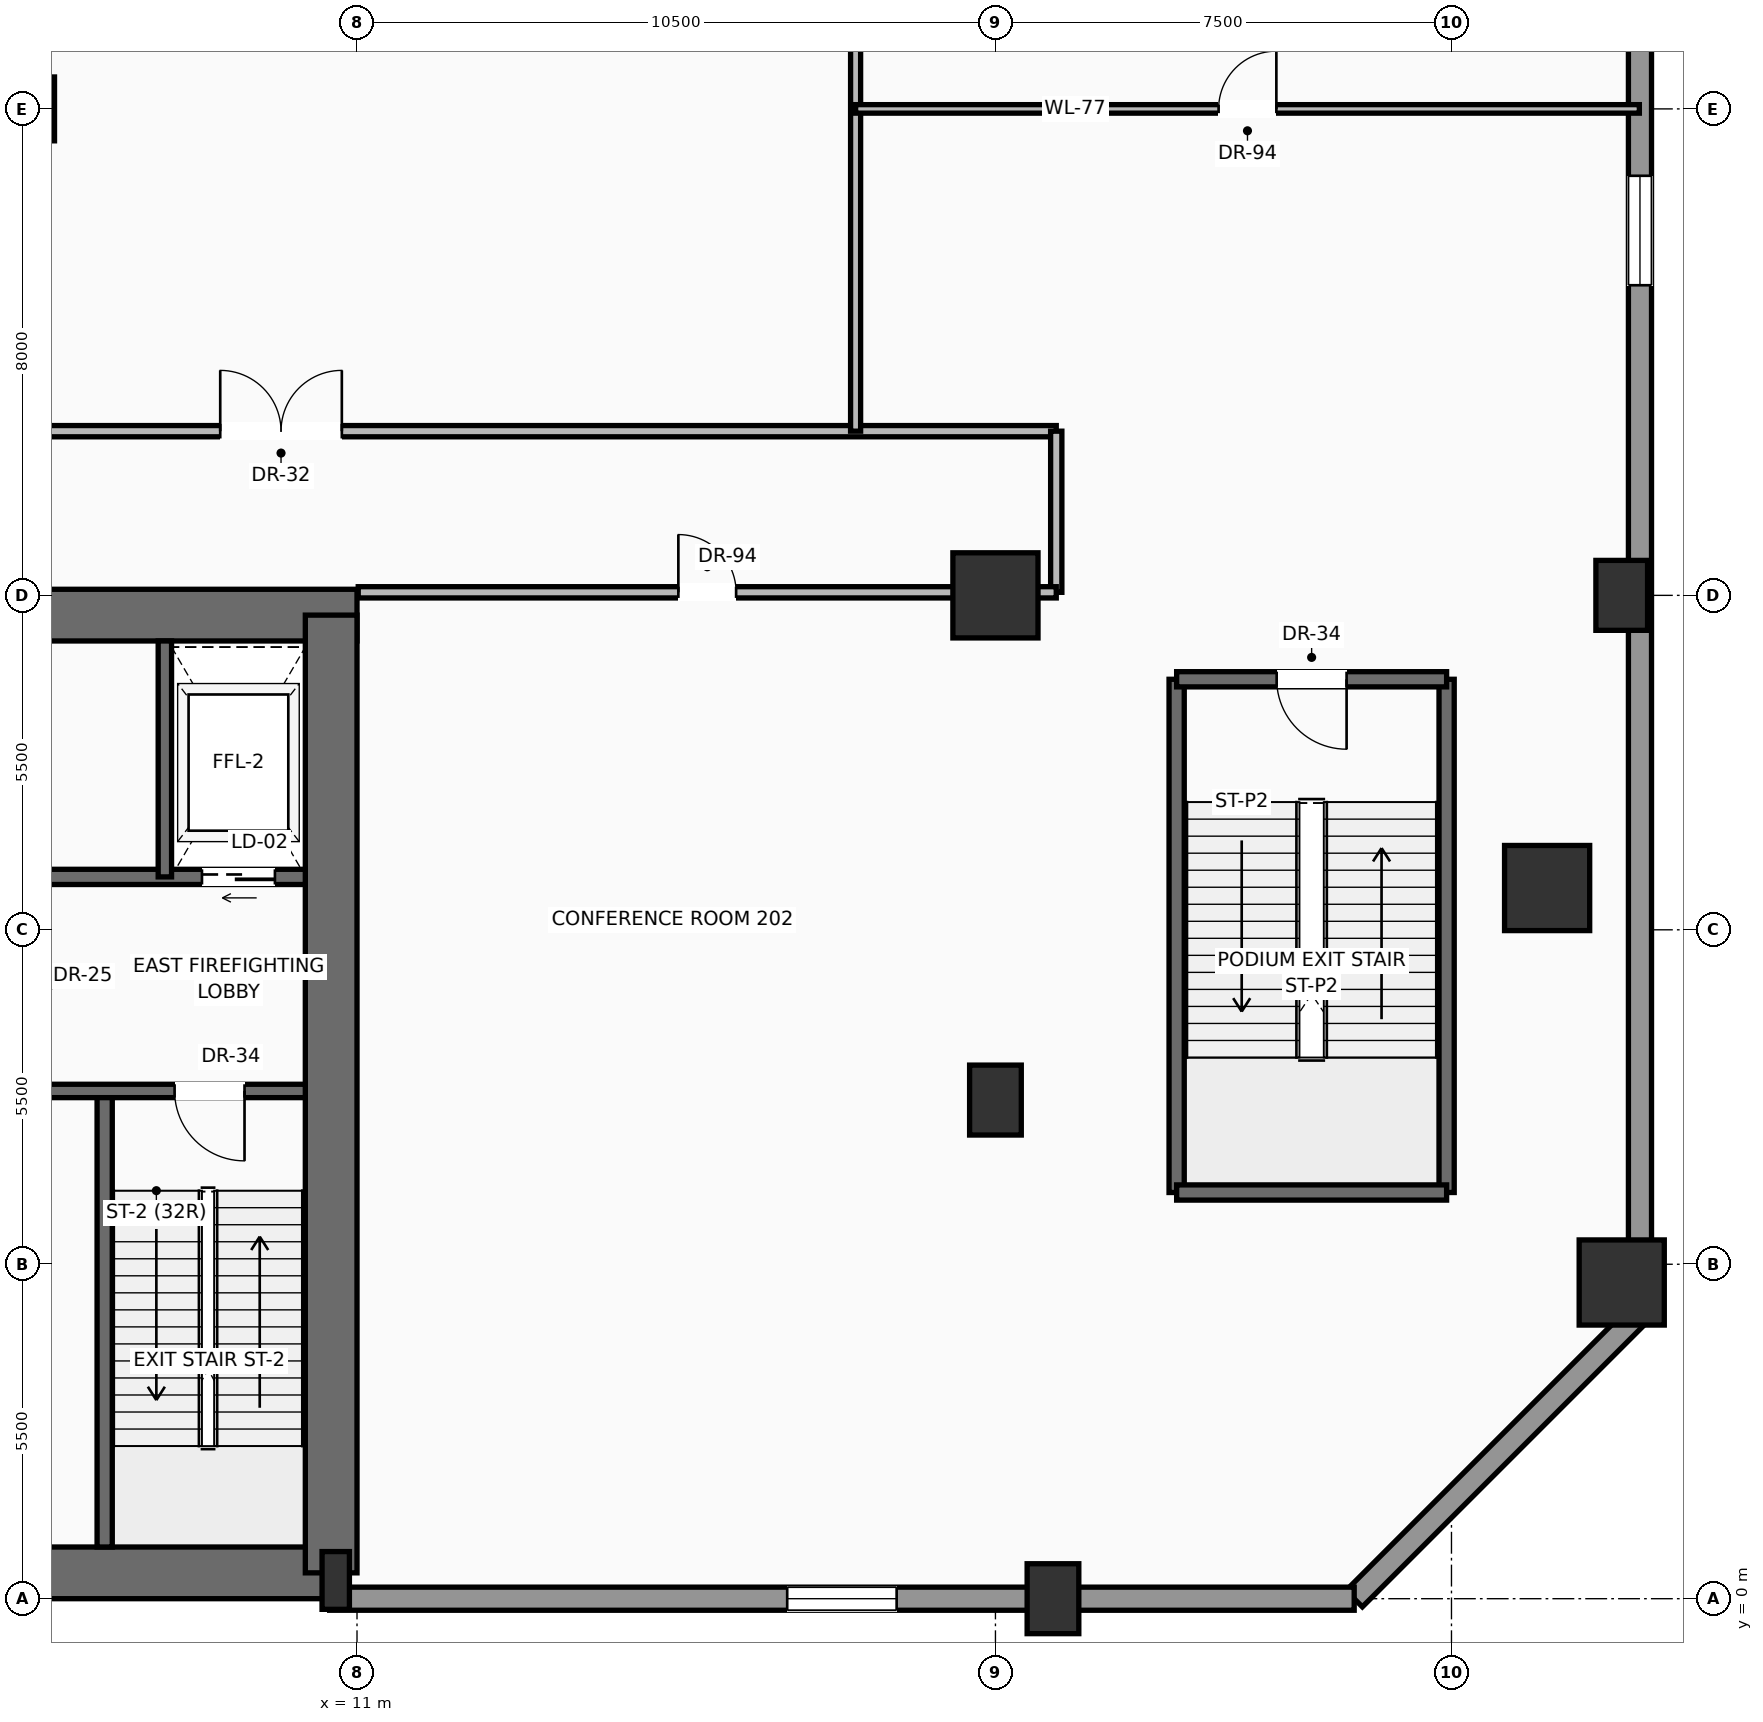
"""IFC4 building model, lengths in metres.
Left out: names, types, materials, properties, quantities, classifications, styles, units other than length and angle.
Written with IfcOpenShell. Run it as: python <this file> out.ifc"""

import sys

from ifc_helpers import new_model, si_unit, direction, frame, frame_2d, origin, origin_2d, place, context, subcontext, project, spatial, rectangle, hollow_rectangle, extrude, source, transform, mapped, element, fill, save


model = new_model("IFC4")
c1 = context("Model", 3, precision=1e-05, world=origin(), true_north=direction((0.0, 1.0)))
c2 = subcontext(c1, "Body", "Model", "MODEL_VIEW")
j1 = project(units=[si_unit("LENGTHUNIT", "METRE"), si_unit("PLANEANGLEUNIT", "RADIAN")], contexts=[c1])
p1 = place(None, origin())
s1 = spatial("IfcSite", under=j1, at=p1, CompositionType="ELEMENT")
p2 = place(p1, origin())
s2 = spatial("IfcBuilding", under=s1, at=p2, CompositionType="ELEMENT")
p3 = place(p2, frame((0.0, 0.0, 11.0)))
s3 = spatial("IfcBuildingStorey", under=s2, at=p3, CompositionType="ELEMENT", Elevation=11.0)
p4 = place(p3, frame((-10.65, 0.425, 0.0), z_axis=(0.0, 0.0, 1.0), x_axis=(1.0, 0.0, 0.0)))
e1 = element("IfcWall", 1, at=p4, inside=s3, PredefinedType="SHEAR", context=c2, shape_type="SweptSolid", body=[
    extrude(rectangle(XDim=21.3, YDim=0.85, at=frame_2d((10.65, 0.0))), origin(), (0.0, 0.0, 1.0), 5.185),
])
p5 = place(p3, frame((-11.0, 16.175, 0.0), z_axis=(0.0, 0.0, 1.0), x_axis=(1.0, 0.0, 0.0)))
e2 = element("IfcWall", 2, at=p5, inside=s3, PredefinedType="SHEAR", context=c2, shape_type="SweptSolid", body=[
    extrude(rectangle(XDim=22.0, YDim=0.85, at=frame_2d((11.0, 0.0))), origin(), (0.0, 0.0, 1.0), 5.185),
])
p6 = place(p5, frame((3.57, 0.0, 0.0)))
e3 = element("IfcOpeningElement", 3, at=p6, cuts=e2, PredefinedType="OPENING", context=c2, shape_type="SweptSolid", body=[
    extrude(rectangle(XDim=1.3, YDim=2.3, at=frame_2d((0.65, 1.15))), frame((0.0, 0.435, 0.0), z_axis=(0.0, -1.0, 0.0), x_axis=(1.0, 0.0, 0.0)), (0.0, 0.0, 1.0), 0.87),
])
p7 = place(p5, frame((10.0, 0.0, 0.0)))
e4 = element("IfcOpeningElement", 4, at=p7, cuts=e2, PredefinedType="OPENING", context=c2, shape_type="SweptSolid", body=[
    extrude(rectangle(XDim=2.0, YDim=2.4, at=frame_2d((1.0, 1.2))), frame((0.0, 0.435, 0.0), z_axis=(0.0, -1.0, 0.0), x_axis=(1.0, 0.0, 0.0)), (0.0, 0.0, 1.0), 0.87),
])
p8 = place(p3, frame((10.575, 0.425, 0.0), z_axis=(0.0, 0.0, 1.0), x_axis=(0.0, 1.0, 0.0)))
e5 = element("IfcWall", 5, at=p8, inside=s3, PredefinedType="SHEAR", context=c2, shape_type="SweptSolid", body=[
    extrude(rectangle(XDim=15.75, YDim=0.85, at=frame_2d((7.875, 0.0))), origin(), (0.0, 0.0, 1.0), 5.185),
])
m1 = source(origin(), c2, "Body", "SweptSolid", [
    extrude(rectangle(XDim=0.45, YDim=0.95, at=origin_2d()), origin(), (0.0, 0.0, 1.0), 5.5),
])
p9 = place(p3, frame((10.65, 0.3, 0.0), z_axis=(0.0, 0.0, 1.0), x_axis=(1.0, 0.0, 0.0)))
e6 = element("IfcColumn", 6, at=p9, inside=s3, PredefinedType="PILASTER", context=c2, shape_type="MappedRepresentation", body=[
    mapped(m1, transform((0.0, 0.0, 0.0), scale=1.0)),
])
m2 = source(origin(), c2, "Body", "SweptSolid", [
    extrude(rectangle(XDim=1.05, YDim=1.05, at=origin_2d()), origin(), (0.0, 0.0, 1.0), 5.5),
])
p10 = place(p3, frame((5.5, 24.5, 0.0), z_axis=(0.0, 0.0, 1.0), x_axis=(1.0, 0.0, 0.0)))
e7 = element("IfcColumn", 7, at=p10, inside=s3, PredefinedType="COLUMN", context=c2, shape_type="MappedRepresentation", body=[
    mapped(m2, transform((0.0, 0.0, 0.0), scale=1.0)),
])
m3 = source(origin(), c2, "Body", "SweptSolid", [
    extrude(rectangle(XDim=0.85, YDim=1.15, at=origin_2d()), origin(), (0.0, 0.0, 1.0), 5.5),
])
for number, where, z_axis, x_axis in (
    (8, (22.446, 0.0, 0.0), (0.0, 0.0, 1.0), (1.0, 0.0, 0.0)),
    (9, (21.5, 8.2, 0.0), (0.0, 0.0, 1.0), (1.0, 0.0, 0.0)),
    (10, (31.8, 16.5, 0.0), (0.0, 0.0, 1.0), (1.0, 0.0, 0.0)),
):
    element("IfcColumn", number, at=place(p3, frame(where, z_axis=z_axis, x_axis=x_axis)), inside=s3, PredefinedType="COLUMN", context=c2, shape_type="MappedRepresentation", body=[
        mapped(m3, transform((0.0, 0.0, 0.0), scale=1.0)),
    ])
m4 = source(origin(), c2, "Body", "SweptSolid", [
    extrude(hollow_rectangle(XDim=1.4, YDim=1.4, WallThickness=0.07, at=origin_2d()), origin(), (0.0, 0.0, 1.0), 5.5),
])
for number, where, z_axis, x_axis in (
    (11, (21.5, 16.5, 0.0), (0.0, 0.0, 1.0), (1.0, 0.0, 0.0)),
    (12, (31.8, 5.2, 0.0), (0.0, 0.0, 1.0), (1.0, 0.0, 0.0)),
    (13, (30.573, 11.687, 0.0), (0.0, 0.0, 1.0), (1.0, 0.0, 0.0)),
):
    element("IfcColumn", number, at=place(p3, frame(where, z_axis=z_axis, x_axis=x_axis)), inside=s3, PredefinedType="COLUMN", context=c2, shape_type="MappedRepresentation", body=[
        mapped(m4, transform((0.0, 0.0, 0.0), scale=1.0)),
    ])
p11 = place(p3, frame((32.1, 41.1, 0.0), z_axis=(0.0, 0.0, 1.0), x_axis=(0.0, -1.0, 0.0)))
e14 = element("IfcWall", 14, at=p11, inside=s3, PredefinedType="SOLIDWALL", context=c2, shape_type="SweptSolid", body=[
    extrude(rectangle(XDim=36.4, YDim=0.38, at=frame_2d((18.2, 0.0))), origin(), (0.0, 0.0, 1.0), 4.125),
])
p12 = place(p11, frame((17.7, 0.0, 0.95)))
e15 = element("IfcOpeningElement", 15, at=p12, cuts=e14, PredefinedType="OPENING", context=c2, shape_type="SweptSolid", body=[
    extrude(rectangle(XDim=1.8, YDim=2.4, at=frame_2d((0.9, 1.2))), frame((0.0, 0.2, 0.0), z_axis=(0.0, -1.0, 0.0), x_axis=(1.0, 0.0, 0.0)), (0.0, 0.0, 1.0), 0.4),
])
p13 = place(p11, frame((7.2, 0.0, 0.95)))
e16 = element("IfcOpeningElement", 16, at=p13, cuts=e14, PredefinedType="OPENING", context=c2, shape_type="SweptSolid", body=[
    extrude(rectangle(XDim=1.8, YDim=2.4, at=frame_2d((0.9, 1.2))), frame((0.0, 0.2, 0.0), z_axis=(0.0, -1.0, 0.0), x_axis=(1.0, 0.0, 0.0)), (0.0, 0.0, 1.0), 0.4),
])
p14 = place(p3, frame((32.1, 4.7, 0.0), z_axis=(0.0, 0.0, 1.0), x_axis=(-0.707125145927, -0.707088415969, 0.0)))
e17 = element("IfcWall", 17, at=p14, inside=s3, PredefinedType="SOLIDWALL", context=c2, shape_type="SweptSolid", body=[
    extrude(rectangle(XDim=6.647, YDim=0.38, at=frame_2d((3.323, 0.0))), origin(), (0.0, 0.0, 1.0), 4.125),
])
p15 = place(p3, frame((27.4, 0.0, 0.0), z_axis=(0.0, 0.0, 1.0), x_axis=(-1.0, 0.0, 0.0)))
e18 = element("IfcWall", 18, at=p15, inside=s3, PredefinedType="SOLIDWALL", context=c2, shape_type="SweptSolid", body=[
    extrude(rectangle(XDim=16.85, YDim=0.38, at=frame_2d((8.425, 0.0))), origin(), (0.0, 0.0, 1.0), 4.125),
])
p16 = place(p15, frame((7.525, 0.0, 0.95)))
e19 = element("IfcOpeningElement", 19, at=p16, cuts=e18, PredefinedType="OPENING", context=c2, shape_type="SweptSolid", body=[
    extrude(rectangle(XDim=1.8, YDim=2.4, at=frame_2d((0.9, 1.2))), frame((0.0, 0.2, 0.0), z_axis=(0.0, -1.0, 0.0), x_axis=(1.0, 0.0, 0.0)), (0.0, 0.0, 1.0), 0.4),
])
p17 = place(p3, frame((6.85, 0.85, 0.0), z_axis=(0.0, 0.0, 1.0), x_axis=(0.0, 1.0, 0.0)))
e20 = element("IfcWall", 20, at=p17, inside=s3, PredefinedType="SOLIDWALL", context=c2, shape_type="SweptSolid", body=[
    extrude(rectangle(XDim=7.5, YDim=0.25, at=frame_2d((3.75, 0.0))), origin(), (0.0, 0.0, 1.0), 5.185),
])
p18 = place(p3, frame((10.15, 8.35, 0.0), z_axis=(0.0, 0.0, 1.0), x_axis=(-1.0, 0.0, 0.0)))
e21 = element("IfcWall", 21, at=p18, inside=s3, PredefinedType="SOLIDWALL", context=c2, shape_type="SweptSolid", body=[
    extrude(rectangle(XDim=4.65, YDim=0.22, at=frame_2d((2.325, 0.0))), origin(), (0.0, 0.0, 1.0), 5.185),
])
p19 = place(p18, frame((1.0, 0.0, 0.0)))
e22 = element("IfcOpeningElement", 22, at=p19, cuts=e21, PredefinedType="OPENING", context=c2, shape_type="SweptSolid", body=[
    extrude(rectangle(XDim=1.15, YDim=2.2, at=frame_2d((0.575, 1.1))), frame((0.0, 0.12, 0.0), z_axis=(0.0, -1.0, 0.0), x_axis=(1.0, 0.0, 0.0)), (0.0, 0.0, 1.0), 0.24),
])
p20 = place(p3, frame((10.15, 11.87, 0.0), z_axis=(0.0, 0.0, 1.0), x_axis=(-1.0, 0.0, 0.0)))
e23 = element("IfcWall", 23, at=p20, inside=s3, PredefinedType="SOLIDWALL", context=c2, shape_type="SweptSolid", body=[
    extrude(rectangle(XDim=4.65, YDim=0.25, at=frame_2d((2.325, 0.0))), origin(), (0.0, 0.0, 1.0), 5.185),
])
p21 = place(p20, frame((0.5, 0.0, 0.0)))
e24 = element("IfcOpeningElement", 24, at=p21, cuts=e23, PredefinedType="OPENING", context=c2, shape_type="SweptSolid", body=[
    extrude(rectangle(XDim=1.2, YDim=2.25, at=frame_2d((0.6, 1.125))), frame((0.0, 0.135, 0.0), z_axis=(0.0, -1.0, 0.0), x_axis=(1.0, 0.0, 0.0)), (0.0, 0.0, 1.0), 0.27),
])
p22 = place(p3, frame((7.84, 11.87, 0.0), z_axis=(0.0, 0.0, 1.0), x_axis=(0.0, 1.0, 0.0)))
e25 = element("IfcWall", 25, at=p22, inside=s3, PredefinedType="SOLIDWALL", context=c2, shape_type="SweptSolid", body=[
    extrude(rectangle(XDim=3.88, YDim=0.22, at=frame_2d((1.94, 0.0))), origin(), (0.0, 0.0, 1.0), 5.185),
])
for number, where, z_axis, x_axis in (
    (26, (24.48, 6.68, 0.0), (0.0, 0.0, 1.0), (0.0, 1.0, 0.0)),
    (27, (28.92, 6.68, 0.0), (0.0, 0.0, 1.0), (0.0, 1.0, 0.0)),
):
    element("IfcWall", number, at=place(p3, frame(where, z_axis=z_axis, x_axis=x_axis)), inside=s3, PredefinedType="SOLIDWALL", context=c2, shape_type="SweptSolid", body=[
        extrude(rectangle(XDim=8.44, YDim=0.25, at=frame_2d((4.22, 0.0))), origin(), (0.0, 0.0, 1.0), 5.185),
    ])
p23 = place(p3, frame((24.48, 6.68, 0.0), z_axis=(0.0, 0.0, 1.0), x_axis=(1.0, 0.0, 0.0)))
e28 = element("IfcWall", 28, at=p23, inside=s3, PredefinedType="SOLIDWALL", context=c2, shape_type="SweptSolid", body=[
    extrude(rectangle(XDim=4.44, YDim=0.25, at=frame_2d((2.22, 0.0))), origin(), (0.0, 0.0, 1.0), 5.185),
])
p24 = place(p3, frame((28.92, 15.12, 0.0), z_axis=(0.0, 0.0, 1.0), x_axis=(-1.0, 0.0, 0.0)))
e29 = element("IfcWall", 29, at=p24, inside=s3, PredefinedType="SOLIDWALL", context=c2, shape_type="SweptSolid", body=[
    extrude(rectangle(XDim=4.44, YDim=0.25, at=frame_2d((2.22, 0.0))), origin(), (0.0, 0.0, 1.0), 5.185),
])
p25 = place(p24, frame((1.645, 0.0, 0.0)))
e30 = element("IfcOpeningElement", 30, at=p25, cuts=e29, PredefinedType="OPENING", context=c2, shape_type="SweptSolid", body=[
    extrude(rectangle(XDim=1.15, YDim=2.2, at=frame_2d((0.575, 1.1))), frame((0.0, 0.135, 0.0), z_axis=(0.0, -1.0, 0.0), x_axis=(1.0, 0.0, 0.0)), (0.0, 0.0, 1.0), 0.27),
])
p26 = place(p3, frame((-22.5, 19.2, 0.0), z_axis=(0.0, 0.0, 1.0), x_axis=(1.0, 0.0, 0.0)))
e31 = element("IfcWall", 31, at=p26, inside=s3, PredefinedType="PARTITIONING", context=c2, shape_type="SweptSolid", body=[
    extrude(rectangle(XDim=45.0, YDim=0.185, at=frame_2d((22.5, 0.0))), origin(), (0.0, 0.0, 1.0), 4.137),
])
p27 = place(p26, frame((11.75, 0.0, 0.0)))
e32 = element("IfcOpeningElement", 32, at=p27, cuts=e31, PredefinedType="OPENING", context=c2, shape_type="SweptSolid", body=[
    extrude(rectangle(XDim=2.0, YDim=2.4, at=frame_2d((1.0, 1.2))), frame((0.0, 0.103, 0.0), z_axis=(0.0, -1.0, 0.0), x_axis=(1.0, 0.0, 0.0)), (0.0, 0.0, 1.0), 0.205),
])
p28 = place(p26, frame((31.25, 0.0, 0.0)))
e33 = element("IfcOpeningElement", 33, at=p28, cuts=e31, PredefinedType="OPENING", context=c2, shape_type="SweptSolid", body=[
    extrude(rectangle(XDim=2.0, YDim=2.4, at=frame_2d((1.0, 1.2))), frame((0.0, 0.103, 0.0), z_axis=(0.0, -1.0, 0.0), x_axis=(1.0, 0.0, 0.0)), (0.0, 0.0, 1.0), 0.205),
])
p29 = place(p3, frame((22.5, 16.55, 0.0), z_axis=(0.0, 0.0, 1.0), x_axis=(0.0, 1.0, 0.0)))
e34 = element("IfcWall", 34, at=p29, inside=s3, PredefinedType="PARTITIONING", context=c2, shape_type="SweptSolid", body=[
    extrude(rectangle(XDim=2.65, YDim=0.185, at=frame_2d((1.325, 0.0))), origin(), (0.0, 0.0, 1.0), 5.177),
])
p30 = place(p3, frame((11.02, 16.55, 0.0), z_axis=(0.0, 0.0, 1.0), x_axis=(1.0, 0.0, 0.0)))
e35 = element("IfcWall", 35, at=p30, inside=s3, PredefinedType="PARTITIONING", context=c2, shape_type="SweptSolid", body=[
    extrude(rectangle(XDim=11.48, YDim=0.185, at=frame_2d((5.74, 0.0))), origin(), (0.0, 0.0, 1.0), 4.137),
])
p31 = place(p30, frame((5.265, 0.0, 0.0)))
e36 = element("IfcOpeningElement", 36, at=p31, cuts=e35, PredefinedType="OPENING", context=c2, shape_type="SweptSolid", body=[
    extrude(rectangle(XDim=0.95, YDim=2.2, at=frame_2d((0.475, 1.1))), frame((0.0, 0.103, 0.0), z_axis=(0.0, -1.0, 0.0), x_axis=(1.0, 0.0, 0.0)), (0.0, 0.0, 1.0), 0.205),
])
p32 = place(p3, frame((19.2, 19.2, 0.0), z_axis=(0.0, 0.0, 1.0), x_axis=(0.0, 1.0, 0.0)))
e37 = element("IfcWall", 37, at=p32, inside=s3, PredefinedType="PARTITIONING", context=c2, shape_type="SweptSolid", body=[
    extrude(rectangle(XDim=20.4, YDim=0.165, at=frame_2d((10.2, 0.0))), origin(), (0.0, 0.0, 1.0), 4.137),
])
p33 = place(p32, frame((8.464, 0.0, 0.0)))
e38 = element("IfcOpeningElement", 38, at=p33, cuts=e37, PredefinedType="OPENING", context=c2, shape_type="SweptSolid", body=[
    extrude(rectangle(XDim=1.5, YDim=2.25, at=frame_2d((0.75, 1.125))), frame((0.0, 0.093, 0.0), z_axis=(0.0, -1.0, 0.0), x_axis=(1.0, 0.0, 0.0)), (0.0, 0.0, 1.0), 0.185),
])
p34 = place(p3, frame((19.2, 24.5, 0.0), z_axis=(0.0, 0.0, 1.0), x_axis=(1.0, 0.0, 0.0)))
e39 = element("IfcWall", 39, at=p34, inside=s3, PredefinedType="PARTITIONING", context=c2, shape_type="SweptSolid", body=[
    extrude(rectangle(XDim=12.89, YDim=0.14, at=frame_2d((6.445, 0.0))), origin(), (0.0, 0.0, 1.0), 4.25),
])
p35 = place(p34, frame((5.97, 0.0, 0.0)))
e40 = element("IfcOpeningElement", 40, at=p35, cuts=e39, PredefinedType="OPENING", context=c2, shape_type="SweptSolid", body=[
    extrude(rectangle(XDim=0.95, YDim=2.2, at=frame_2d((0.475, 1.1))), frame((0.0, 0.08, 0.0), z_axis=(0.0, -1.0, 0.0), x_axis=(1.0, 0.0, 0.0)), (0.0, 0.0, 1.0), 0.16),
])
m5 = source(origin(), c2, "Body", "SweptSolid", [
    extrude(rectangle(XDim=1.8, YDim=2.4, at=frame_2d((0.9, 1.2))), frame((0.0, 0.03, 0.0), z_axis=(0.0, -1.0, 0.0), x_axis=(1.0, 0.0, 0.0)), (0.0, 0.0, 1.0), 0.06),
])
p36 = place(p12, origin())
e41 = element("IfcWindow", 41, at=p36, inside=s3, PartitioningType="SINGLE_PANEL", PredefinedType="WINDOW", context=c2, shape_type="MappedRepresentation", body=[
    mapped(m5, transform((0.0, 0.0, 0.0), scale=1.0)),
])
fill(e15, e41)
p37 = place(p16, origin())
e42 = element("IfcWindow", 42, at=p37, inside=s3, PartitioningType="SINGLE_PANEL", PredefinedType="WINDOW", context=c2, shape_type="MappedRepresentation", body=[
    mapped(m5, transform((0.0, 0.0, 0.0), scale=1.0)),
])
fill(e19, e42)
m6 = source(origin(), c2, "Body", "SweptSolid", [
    extrude(rectangle(XDim=1.15, YDim=2.2, at=frame_2d((0.575, 1.1))), frame((0.0, 0.025, 0.0), z_axis=(0.0, -1.0, 0.0), x_axis=(1.0, 0.0, 0.0)), (0.0, 0.0, 1.0), 0.05),
])
p38 = place(p19, origin())
e43 = element("IfcDoor", 43, at=p38, inside=s3, OperationType="SINGLE_SWING_LEFT", PredefinedType="DOOR", context=c2, shape_type="MappedRepresentation", body=[
    mapped(m6, transform((0.0, 0.0, 0.0), scale=1.0)),
])
fill(e22, e43)
m7 = source(origin(), c2, "Body", "SweptSolid", [
    extrude(rectangle(XDim=1.2, YDim=2.25, at=frame_2d((0.6, 1.125))), frame((0.0, 0.025, 0.0), z_axis=(0.0, -1.0, 0.0), x_axis=(1.0, 0.0, 0.0)), (0.0, 0.0, 1.0), 0.05),
])
p39 = place(p21, origin())
e44 = element("IfcDoor", 44, at=p39, inside=s3, OperationType="SLIDING_TO_RIGHT", PredefinedType="DOOR", context=c2, shape_type="MappedRepresentation", body=[
    mapped(m7, transform((0.0, 0.0, 0.0), scale=1.0)),
])
fill(e24, e44)
p40 = place(p25, origin())
e45 = element("IfcDoor", 45, at=p40, inside=s3, OperationType="SINGLE_SWING_LEFT", PredefinedType="DOOR", context=c2, shape_type="MappedRepresentation", body=[
    mapped(m6, transform((0.0, 0.0, 0.0), scale=1.0)),
])
fill(e30, e45)
m8 = source(origin(), c2, "Body", "SweptSolid", [
    extrude(rectangle(XDim=2.0, YDim=2.4, at=frame_2d((1.0, 1.2))), frame((0.0, 0.025, 0.0), z_axis=(0.0, -1.0, 0.0), x_axis=(1.0, 0.0, 0.0)), (0.0, 0.0, 1.0), 0.05),
])
p41 = place(p28, origin())
e46 = element("IfcDoor", 46, at=p41, inside=s3, OperationType="DOUBLE_DOOR_SINGLE_SWING", PredefinedType="DOOR", context=c2, shape_type="MappedRepresentation", body=[
    mapped(m8, transform((0.0, 0.0, 0.0), scale=1.0)),
])
fill(e33, e46)
m9 = source(origin(), c2, "Body", "SweptSolid", [
    extrude(rectangle(XDim=0.95, YDim=2.2, at=frame_2d((0.475, 1.1))), frame((0.0, 0.025, 0.0), z_axis=(0.0, -1.0, 0.0), x_axis=(1.0, 0.0, 0.0)), (0.0, 0.0, 1.0), 0.05),
])
p42 = place(p31, origin())
e47 = element("IfcDoor", 47, at=p42, inside=s3, OperationType="SINGLE_SWING_LEFT", PredefinedType="DOOR", context=c2, shape_type="MappedRepresentation", body=[
    mapped(m9, transform((0.0, 0.0, 0.0), scale=1.0)),
])
fill(e36, e47)
p43 = place(p35, origin())
e48 = element("IfcDoor", 48, at=p43, inside=s3, OperationType="SINGLE_SWING_RIGHT", PredefinedType="DOOR", context=c2, shape_type="MappedRepresentation", body=[
    mapped(m9, transform((0.0, 0.0, 0.0), scale=1.0)),
])
fill(e40, e48)
save(model, sys.argv[1])
